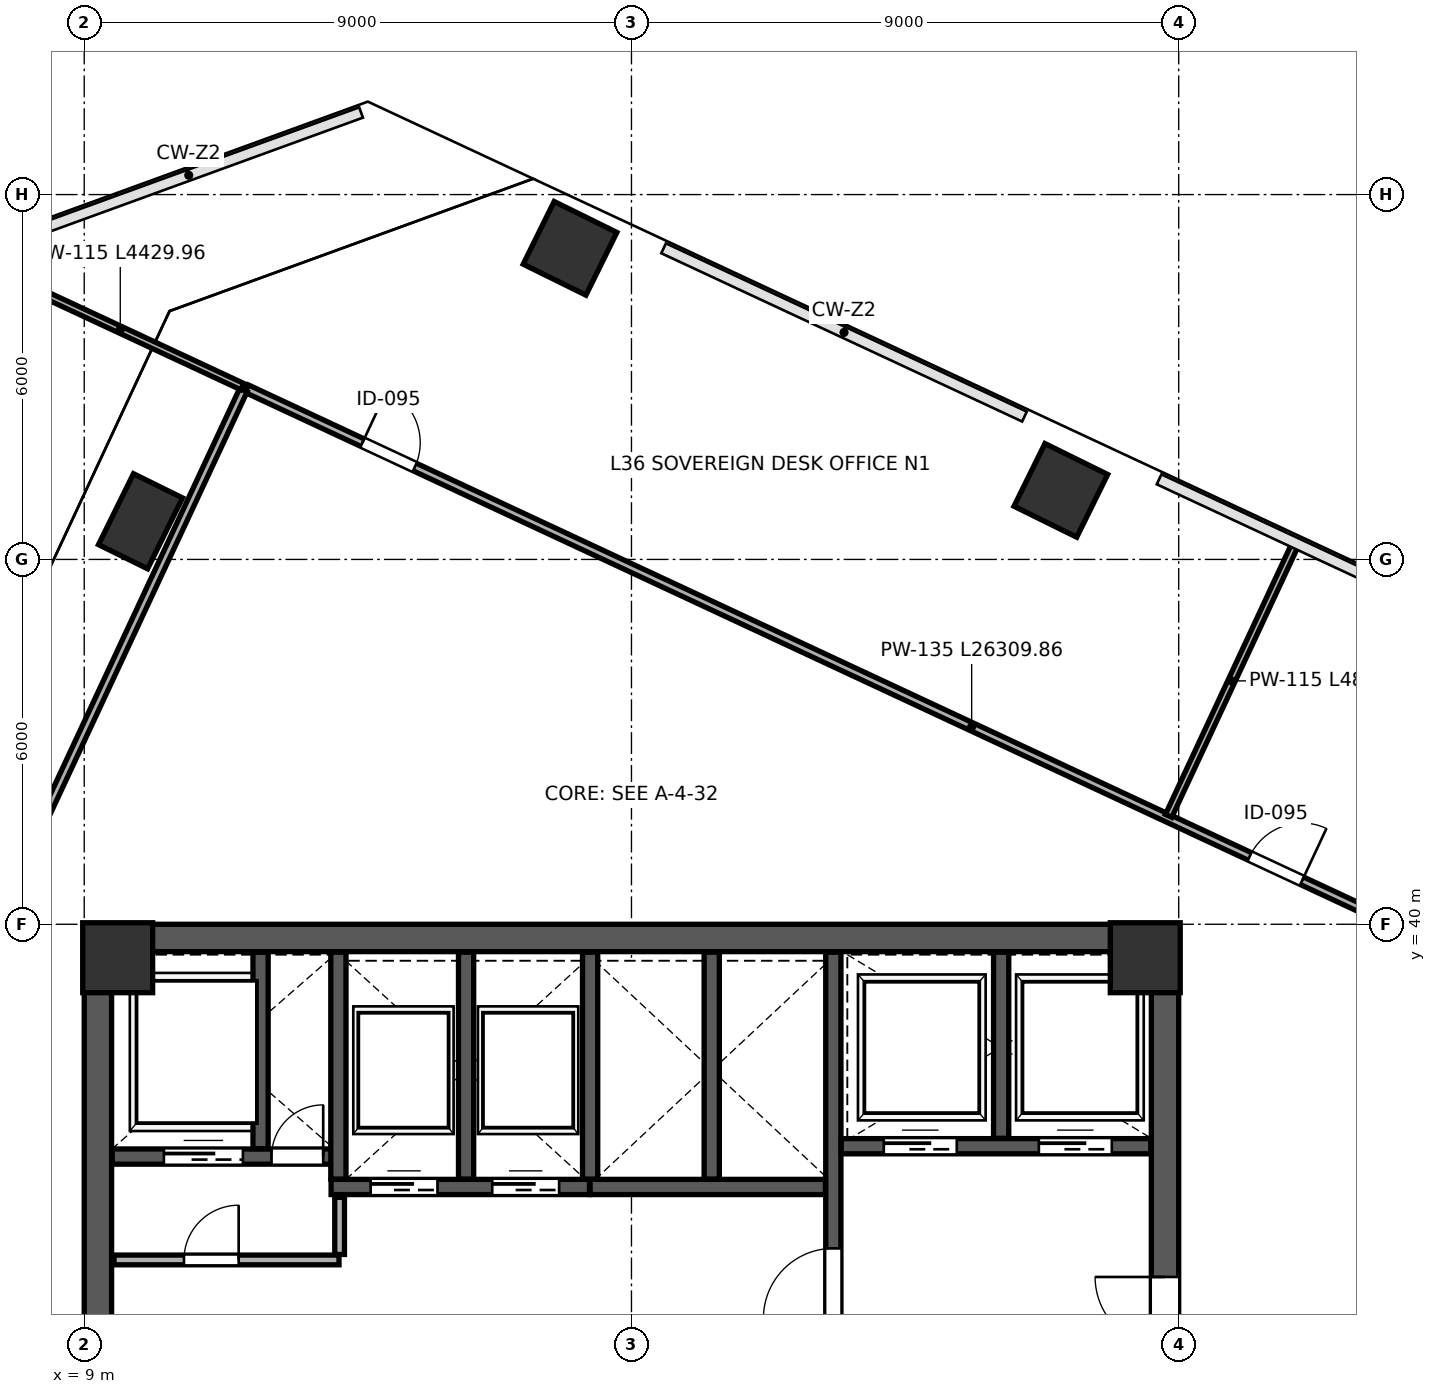
"""IFC4 building model, lengths in metres.
Left out: names, types, materials, properties, quantities, classifications, styles, units other than length and angle.
Written with IfcOpenShell. Run it as: python <this file> out.ifc"""

import sys

from ifc_helpers import new_model, si_unit, direction, frame, frame_2d, origin, origin_2d, place, context, subcontext, project, spatial, rectangle, extrude, clip, halfspace, source, transform, mapped, element, fill, save


model = new_model("IFC4")
c1 = context("Model", 3, precision=1e-05, world=origin(), true_north=direction((0.0, 1.0)))
c2 = subcontext(c1, "Body", "Model", "MODEL_VIEW")
j1 = project(units=[si_unit("LENGTHUNIT", "METRE"), si_unit("PLANEANGLEUNIT", "RADIAN")], contexts=[c1])
p1 = place(None, origin())
s1 = spatial("IfcSite", under=j1, at=p1, CompositionType="ELEMENT")
p2 = place(p1, origin())
s2 = spatial("IfcBuilding", under=s1, at=p2, CompositionType="ELEMENT")
p3 = place(p2, frame((0.0, 0.0, 162.4)))
s3 = spatial("IfcBuildingStorey", under=s2, at=p3, CompositionType="ELEMENT", Elevation=162.4)
m1 = source(origin(), c2, "Body", "SweptSolid", [
    extrude(rectangle(XDim=1.15, YDim=1.15, at=origin_2d()), origin(), (0.0, 0.0, 1.0), 4.199),
])
for number, where, z_axis, x_axis in (
    (1, (9.55, 39.45, 0.001), (0.0, 0.0, 1.0), (1.0, 0.0, 0.0)),
    (2, (26.45, 39.45, 0.001), (0.0, 0.0, 1.0), (1.0, 0.0, 0.0)),
):
    element("IfcColumn", number, at=place(p3, frame(where, z_axis=z_axis, x_axis=x_axis)), inside=s3, PredefinedType="COLUMN", context=c2, shape_type="MappedRepresentation", body=[
        mapped(m1, transform((0.0, 0.0, 0.0), scale=1.0)),
    ])
p4 = place(p3, frame((16.99, 51.116, 0.0), z_axis=(0.099055374896, 0.022262883441, 0.994832848636), x_axis=(-0.232626468204, -0.971528980681, 0.044903964055)))
e3 = element("IfcColumn", 3, at=p4, inside=s3, PredefinedType="COLUMN", context=c2, shape_type="Clipping", body=[
    clip(clip(extrude(rectangle(XDim=1.15, YDim=1.15, at=origin_2d()), origin(), (0.0, 0.0, 1.0), 4.222), halfspace(frame((0.0, 0.0, 0.079), z_axis=(0.0, 0.0, -1.0), x_axis=(1.0, 0.0, 0.0)), False)), halfspace(frame((0.0, 0.0, 4.143), z_axis=(0.0, 0.0, 1.0), x_axis=(1.0, 0.0, 0.0)), False)),
])
p5 = place(p3, frame((25.062, 47.135, 0.0), z_axis=(0.078215080244, -0.019293053127, 0.996749807787), x_axis=(-0.642812730681, -0.765194262388, 0.0356305218)))
e4 = element("IfcColumn", 4, at=p5, inside=s3, PredefinedType="COLUMN", context=c2, shape_type="Clipping", body=[
    clip(clip(extrude(rectangle(XDim=1.15, YDim=1.15, at=origin_2d()), origin(), (0.0, 0.0, 1.0), 4.214), halfspace(frame((0.0, 0.0, 0.063), z_axis=(0.0, 0.0, -1.0), x_axis=(1.0, 0.0, 0.0)), False)), halfspace(frame((0.0, 0.0, 4.151), z_axis=(0.0, 0.0, 1.0), x_axis=(1.0, 0.0, 0.0)), False)),
])
p6 = place(p3, frame((9.926, 46.627, 0.0), z_axis=(0.076252876943, 0.059069944885, 0.995337249564), x_axis=(0.201228472882, -0.978614892024, 0.042661397204)))
e5 = element("IfcColumn", 5, at=p6, inside=s3, PredefinedType="PILASTER", context=c2, shape_type="Clipping", body=[
    clip(clip(extrude(rectangle(XDim=0.9, YDim=1.3, at=origin_2d()), origin(), (0.0, 0.0, 1.0), 4.22), halfspace(frame((0.0, 0.0, 0.076), z_axis=(0.0, 0.0, -1.0), x_axis=(1.0, 0.0, 0.0)), False)), halfspace(frame((0.0, 0.0, 4.144), z_axis=(0.0, 0.0, 1.0), x_axis=(1.0, 0.0, 0.0)), False)),
])
p7 = place(p3, frame((9.225, 24.45, 0.0), z_axis=(0.0, 0.0, 1.0), x_axis=(0.0, 1.0, 0.0)))
e6 = element("IfcWall", 6, at=p7, inside=s3, PredefinedType="SHEAR", context=c2, shape_type="SweptSolid", body=[
    extrude(rectangle(XDim=15.1, YDim=0.45, at=frame_2d((7.55, 0.0))), origin(), (0.0, 0.0, 1.0), 3.96),
])
p8 = place(p3, frame((26.775, 24.45, 0.0), z_axis=(0.0, 0.0, 1.0), x_axis=(0.0, 1.0, 0.0)))
e7 = element("IfcWall", 7, at=p8, inside=s3, PredefinedType="SHEAR", context=c2, shape_type="SweptSolid", body=[
    extrude(rectangle(XDim=15.1, YDim=0.45, at=frame_2d((7.55, 0.0))), origin(), (0.0, 0.0, 1.0), 3.96),
])
p9 = place(p8, frame((8.6, 0.0, 0.0)))
e8 = element("IfcOpeningElement", 8, at=p9, cuts=e7, PredefinedType="OPENING", context=c2, shape_type="SweptSolid", body=[
    extrude(rectangle(XDim=1.15, YDim=2.2, at=frame_2d((0.575, 1.1))), frame((0.0, 0.235, 0.0), z_axis=(0.0, -1.0, 0.0), x_axis=(1.0, 0.0, 0.0)), (0.0, 0.0, 1.0), 0.47),
])
p10 = place(p3, frame((9.0, 39.775, 0.0), z_axis=(0.0, 0.0, 1.0), x_axis=(1.0, 0.0, 0.0)))
e9 = element("IfcWall", 9, at=p10, inside=s3, PredefinedType="SHEAR", context=c2, shape_type="SweptSolid", body=[
    extrude(rectangle(XDim=18.0, YDim=0.45, at=frame_2d((9.0, 0.0))), origin(), (0.0, 0.0, 1.0), 3.96),
])
p11 = place(p3, frame((21.32, 32.12, 0.0), z_axis=(0.0, 0.0, 1.0), x_axis=(0.0, 1.0, 0.0)))
e10 = element("IfcWall", 10, at=p11, inside=s3, PredefinedType="SHEAR", context=c2, shape_type="SweptSolid", body=[
    extrude(rectangle(XDim=7.42, YDim=0.25, at=frame_2d((3.71, 0.0))), origin(), (0.0, 0.0, 1.0), 3.96),
])
p12 = place(p11, frame((1.4, 0.0, 0.0)))
e11 = element("IfcOpeningElement", 11, at=p12, cuts=e10, PredefinedType="OPENING", context=c2, shape_type="SweptSolid", body=[
    extrude(rectangle(XDim=1.15, YDim=2.2, at=frame_2d((0.575, 1.1))), frame((0.0, 0.135, 0.0), z_axis=(0.0, -1.0, 0.0), x_axis=(1.0, 0.0, 0.0)), (0.0, 0.0, 1.0), 0.27),
])
p13 = place(p3, frame((9.46, 36.18, 0.0), z_axis=(0.0, 0.0, 1.0), x_axis=(1.0, 0.0, 0.0)))
e12 = element("IfcWall", 12, at=p13, inside=s3, PredefinedType="SHEAR", context=c2, shape_type="SweptSolid", body=[
    extrude(rectangle(XDim=3.79, YDim=0.25, at=frame_2d((1.895, 0.0))), origin(), (0.0, 0.0, 1.0), 3.96),
])
p14 = place(p13, frame((2.62, 0.0, 0.0)))
e13 = element("IfcOpeningElement", 13, at=p14, cuts=e12, PredefinedType="OPENING", context=c2, shape_type="SweptSolid", body=[
    extrude(rectangle(XDim=0.85, YDim=2.1, at=frame_2d((0.425, 1.05))), frame((0.0, 0.135, 0.0), z_axis=(0.0, -1.0, 0.0), x_axis=(1.0, 0.0, 0.0)), (0.0, 0.0, 1.0), 0.27),
])
p15 = place(p13, frame((0.85, 0.0, 0.0)))
e14 = element("IfcOpeningElement", 14, at=p15, cuts=e12, PredefinedType="OPENING", context=c2, shape_type="SweptSolid", body=[
    extrude(rectangle(XDim=1.3, YDim=2.25, at=frame_2d((0.65, 1.125))), frame((0.0, 0.135, 0.0), z_axis=(0.0, -1.0, 0.0), x_axis=(1.0, 0.0, 0.0)), (0.0, 0.0, 1.0), 0.27),
])
p16 = place(p3, frame((11.9, 36.31, 0.0), z_axis=(0.0, 0.0, 1.0), x_axis=(0.0, 1.0, 0.0)))
e15 = element("IfcWall", 15, at=p16, inside=s3, PredefinedType="SHEAR", context=c2, shape_type="SweptSolid", body=[
    extrude(rectangle(XDim=3.23, YDim=0.25, at=frame_2d((1.615, 0.0))), origin(), (0.0, 0.0, 1.0), 3.96),
])
p17 = place(p3, frame((21.45, 36.35, 0.0), z_axis=(0.0, 0.0, 1.0), x_axis=(1.0, 0.0, 0.0)))
e16 = element("IfcWall", 16, at=p17, inside=s3, PredefinedType="SHEAR", context=c2, shape_type="SweptSolid", body=[
    extrude(rectangle(XDim=5.09, YDim=0.25, at=frame_2d((2.545, 0.0))), origin(), (0.0, 0.0, 1.0), 3.96),
])
p18 = place(p17, frame((0.7, 0.0, 0.0)))
e17 = element("IfcOpeningElement", 17, at=p18, cuts=e16, PredefinedType="OPENING", context=c2, shape_type="SweptSolid", body=[
    extrude(rectangle(XDim=1.2, YDim=2.2, at=frame_2d((0.6, 1.1))), frame((0.0, 0.135, 0.0), z_axis=(0.0, -1.0, 0.0), x_axis=(1.0, 0.0, 0.0)), (0.0, 0.0, 1.0), 0.27),
])
p19 = place(p17, frame((3.25, 0.0, 0.0)))
e18 = element("IfcOpeningElement", 18, at=p19, cuts=e16, PredefinedType="OPENING", context=c2, shape_type="SweptSolid", body=[
    extrude(rectangle(XDim=1.2, YDim=2.2, at=frame_2d((0.6, 1.1))), frame((0.0, 0.135, 0.0), z_axis=(0.0, -1.0, 0.0), x_axis=(1.0, 0.0, 0.0)), (0.0, 0.0, 1.0), 0.27),
])
p20 = place(p3, frame((24.08, 36.48, 0.0), z_axis=(0.0, 0.0, 1.0), x_axis=(0.0, 1.0, 0.0)))
e19 = element("IfcWall", 19, at=p20, inside=s3, PredefinedType="SHEAR", context=c2, shape_type="SweptSolid", body=[
    extrude(rectangle(XDim=3.06, YDim=0.25, at=frame_2d((1.53, 0.0))), origin(), (0.0, 0.0, 1.0), 3.96),
])
p21 = place(p3, frame((13.06, 35.68, 0.0), z_axis=(0.0, 0.0, 1.0), x_axis=(1.0, 0.0, 0.0)))
e20 = element("IfcWall", 20, at=p21, inside=s3, PredefinedType="SHEAR", context=c2, shape_type="SweptSolid", body=[
    extrude(rectangle(XDim=4.25, YDim=0.25, at=frame_2d((2.125, 0.0))), origin(), (0.0, 0.0, 1.0), 3.96),
])
p22 = place(p21, frame((0.65, 0.0, 0.0)))
e21 = element("IfcOpeningElement", 21, at=p22, cuts=e20, PredefinedType="OPENING", context=c2, shape_type="SweptSolid", body=[
    extrude(rectangle(XDim=1.1, YDim=2.2, at=frame_2d((0.55, 1.1))), frame((0.0, 0.135, 0.0), z_axis=(0.0, -1.0, 0.0), x_axis=(1.0, 0.0, 0.0)), (0.0, 0.0, 1.0), 0.27),
])
p23 = place(p21, frame((2.65, 0.0, 0.0)))
e22 = element("IfcOpeningElement", 22, at=p23, cuts=e20, PredefinedType="OPENING", context=c2, shape_type="SweptSolid", body=[
    extrude(rectangle(XDim=1.1, YDim=2.2, at=frame_2d((0.55, 1.1))), frame((0.0, 0.135, 0.0), z_axis=(0.0, -1.0, 0.0), x_axis=(1.0, 0.0, 0.0)), (0.0, 0.0, 1.0), 0.27),
])
for number, where, z_axis, x_axis in (
    (23, (13.18, 35.81, 0.0), (0.0, 0.0, 1.0), (0.0, 1.0, 0.0)),
    (24, (15.28, 35.81, 0.0), (0.0, 0.0, 1.0), (0.0, 1.0, 0.0)),
):
    element("IfcWall", number, at=place(p3, frame(where, z_axis=z_axis, x_axis=x_axis)), inside=s3, PredefinedType="SHEAR", context=c2, shape_type="SweptSolid", body=[
        extrude(rectangle(XDim=3.73, YDim=0.25, at=frame_2d((1.865, 0.0))), origin(), (0.0, 0.0, 1.0), 3.96),
    ])
p24 = place(p3, frame((17.32, 35.68, 0.0), z_axis=(0.0, 0.0, 1.0), x_axis=(1.0, 0.0, 0.0)))
e25 = element("IfcWall", 25, at=p24, inside=s3, PredefinedType="SHEAR", context=c2, shape_type="SweptSolid", body=[
    extrude(rectangle(XDim=3.87, YDim=0.25, at=frame_2d((1.935, 0.0))), origin(), (0.0, 0.0, 1.0), 3.96),
])
for number, where, z_axis, x_axis in (
    (26, (17.32, 35.81, 0.0), (0.0, 0.0, 1.0), (0.0, 1.0, 0.0)),
    (27, (19.32, 35.81, 0.0), (0.0, 0.0, 1.0), (0.0, 1.0, 0.0)),
):
    element("IfcWall", number, at=place(p3, frame(where, z_axis=z_axis, x_axis=x_axis)), inside=s3, PredefinedType="SHEAR", context=c2, shape_type="SweptSolid", body=[
        extrude(rectangle(XDim=3.73, YDim=0.25, at=frame_2d((1.865, 0.0))), origin(), (0.0, 0.0, 1.0), 3.96),
    ])
p25 = place(p3, frame((9.49, 34.48, 0.0), z_axis=(0.0, 0.0, 1.0), x_axis=(1.0, 0.0, 0.0)))
e28 = element("IfcWall", 28, at=p25, inside=s3, PredefinedType="PARTITIONING", context=c2, shape_type="SweptSolid", body=[
    extrude(rectangle(XDim=3.7, YDim=0.16, at=frame_2d((1.85, 0.0))), origin(), (0.0, 0.0, 1.0), 3.96),
])
p26 = place(p25, frame((1.15, 0.0, 0.0)))
e29 = element("IfcOpeningElement", 29, at=p26, cuts=e28, PredefinedType="OPENING", context=c2, shape_type="SweptSolid", body=[
    extrude(rectangle(XDim=0.9, YDim=2.15, at=frame_2d((0.45, 1.075))), frame((0.0, 0.09, 0.0), z_axis=(0.0, -1.0, 0.0), x_axis=(1.0, 0.0, 0.0)), (0.0, 0.0, 1.0), 0.18),
])
p27 = place(p3, frame((13.2, 34.57, 0.0), z_axis=(0.0, 0.0, 1.0), x_axis=(0.0, 1.0, 0.0)))
e30 = element("IfcWall", 30, at=p27, inside=s3, PredefinedType="PARTITIONING", context=c2, shape_type="SweptSolid", body=[
    extrude(rectangle(XDim=0.94, YDim=0.16, at=frame_2d((0.47, 0.0))), origin(), (0.0, 0.0, 1.0), 3.96),
])
p28 = place(p3, frame((11.673, 48.808, 0.0), z_axis=(0.0, 0.0, 1.0), x_axis=(0.906307085664, -0.422619765836, 0.0)))
e31 = element("IfcWall", 31, at=p28, inside=s3, PredefinedType="PARTITIONING", context=c2, shape_type="SweptSolid", body=[
    extrude(rectangle(XDim=26.31, YDim=0.135, at=frame_2d((13.155, 0.0))), origin(), (0.0, 0.0, 1.0), 3.96),
])
p29 = place(p28, frame((2.1, 0.0, 0.0)))
e32 = element("IfcOpeningElement", 32, at=p29, cuts=e31, PredefinedType="OPENING", context=c2, shape_type="SweptSolid", body=[
    extrude(rectangle(XDim=0.95, YDim=2.15, at=frame_2d((0.475, 1.075))), frame((0.0, 0.078, 0.0), z_axis=(0.0, -1.0, 0.0), x_axis=(1.0, 0.0, 0.0)), (0.0, 0.0, 1.0), 0.155),
])
p30 = place(p28, frame((18.2, 0.0, 0.0)))
e33 = element("IfcOpeningElement", 33, at=p30, cuts=e31, PredefinedType="OPENING", context=c2, shape_type="SweptSolid", body=[
    extrude(rectangle(XDim=0.95, YDim=2.15, at=frame_2d((0.475, 1.075))), frame((0.0, 0.078, 0.0), z_axis=(0.0, -1.0, 0.0), x_axis=(1.0, 0.0, 0.0)), (0.0, 0.0, 1.0), 0.155),
])
p31 = place(p3, frame((26.834, 41.782, 0.0), z_axis=(0.0, 0.0, 1.0), x_axis=(0.422631768009, 0.906301488838, 0.0)))
e34 = element("IfcWall", 34, at=p31, inside=s3, PredefinedType="PARTITIONING", context=c2, shape_type="SweptSolid", body=[
    extrude(rectangle(XDim=4.9, YDim=0.115, at=frame_2d((2.45, 0.0))), origin(), (0.0, 0.0, 1.0), 3.195),
])
p32 = place(p3, frame((1.756, 27.635, 0.0), z_axis=(0.0, 0.0, 1.0), x_axis=(0.422615732035, 0.906308966653, 0.0)))
e35 = element("IfcWall", 35, at=p32, inside=s3, PredefinedType="PARTITIONING", context=c2, shape_type="SweptSolid", body=[
    extrude(rectangle(XDim=23.34, YDim=0.135, at=frame_2d((11.67, 0.0))), origin(), (0.0, 0.0, 1.0), 3.96),
])
p33 = place(p32, frame((1.7, 0.0, 0.0)))
e36 = element("IfcOpeningElement", 36, at=p33, cuts=e35, PredefinedType="OPENING", context=c2, shape_type="SweptSolid", body=[
    extrude(rectangle(XDim=0.95, YDim=2.15, at=frame_2d((0.475, 1.075))), frame((0.0, 0.078, 0.0), z_axis=(0.0, -1.0, 0.0), x_axis=(1.0, 0.0, 0.0)), (0.0, 0.0, 1.0), 0.155),
])
p34 = place(p32, frame((9.8, 0.0, 0.0)))
e37 = element("IfcOpeningElement", 37, at=p34, cuts=e35, PredefinedType="OPENING", context=c2, shape_type="SweptSolid", body=[
    extrude(rectangle(XDim=0.95, YDim=2.15, at=frame_2d((0.475, 1.075))), frame((0.0, 0.078, 0.0), z_axis=(0.0, -1.0, 0.0), x_axis=(1.0, 0.0, 0.0)), (0.0, 0.0, 1.0), 0.155),
])
p35 = place(p3, frame((7.585, 50.714, 0.0), z_axis=(0.0, 0.0, 1.0), x_axis=(0.906295742894, -0.422644089526, 0.0)))
e38 = element("IfcWall", 38, at=p35, inside=s3, PredefinedType="PARTITIONING", context=c2, shape_type="SweptSolid", body=[
    extrude(rectangle(XDim=4.43, YDim=0.115, at=frame_2d((2.215, 0.0))), origin(), (0.0, 0.0, 1.0), 3.96),
])
m2 = source(origin(), c2, "Body", "SweptSolid", [
    extrude(rectangle(XDim=1.15, YDim=2.2, at=frame_2d((0.575, 1.1))), frame((0.0, 0.025, 0.0), z_axis=(0.0, -1.0, 0.0), x_axis=(1.0, 0.0, 0.0)), (0.0, 0.0, 1.0), 0.05),
])
p36 = place(p12, origin())
e39 = element("IfcDoor", 39, at=p36, inside=s3, OperationType="SINGLE_SWING_LEFT", PredefinedType="DOOR", context=c2, shape_type="MappedRepresentation", body=[
    mapped(m2, transform((0.0, 0.0, 0.0), scale=1.0)),
])
fill(e11, e39)
p37 = place(p9, origin())
e40 = element("IfcDoor", 40, at=p37, inside=s3, OperationType="SINGLE_SWING_RIGHT", PredefinedType="DOOR", context=c2, shape_type="MappedRepresentation", body=[
    mapped(m2, transform((0.0, 0.0, 0.0), scale=1.0)),
])
fill(e8, e40)
m3 = source(origin(), c2, "Body", "SweptSolid", [
    extrude(rectangle(XDim=0.85, YDim=2.1, at=frame_2d((0.425, 1.05))), frame((0.0, 0.025, 0.0), z_axis=(0.0, -1.0, 0.0), x_axis=(1.0, 0.0, 0.0)), (0.0, 0.0, 1.0), 0.05),
])
p38 = place(p14, origin())
e41 = element("IfcDoor", 41, at=p38, inside=s3, OperationType="SINGLE_SWING_RIGHT", PredefinedType="DOOR", context=c2, shape_type="MappedRepresentation", body=[
    mapped(m3, transform((0.0, 0.0, 0.0), scale=1.0)),
])
fill(e13, e41)
m4 = source(origin(), c2, "Body", "SweptSolid", [
    extrude(rectangle(XDim=1.1, YDim=2.2, at=frame_2d((0.55, 1.1))), frame((0.0, 0.025, 0.0), z_axis=(0.0, -1.0, 0.0), x_axis=(1.0, 0.0, 0.0)), (0.0, 0.0, 1.0), 0.05),
])
p39 = place(p22, origin())
e42 = element("IfcDoor", 42, at=p39, inside=s3, OperationType="SLIDING_TO_LEFT", PredefinedType="DOOR", context=c2, shape_type="MappedRepresentation", body=[
    mapped(m4, transform((0.0, 0.0, 0.0), scale=1.0)),
])
fill(e21, e42)
p40 = place(p23, origin())
e43 = element("IfcDoor", 43, at=p40, inside=s3, OperationType="SLIDING_TO_RIGHT", PredefinedType="DOOR", context=c2, shape_type="MappedRepresentation", body=[
    mapped(m4, transform((0.0, 0.0, 0.0), scale=1.0)),
])
fill(e22, e43)
m5 = source(origin(), c2, "Body", "SweptSolid", [
    extrude(rectangle(XDim=1.2, YDim=2.2, at=frame_2d((0.6, 1.1))), frame((0.0, 0.025, 0.0), z_axis=(0.0, -1.0, 0.0), x_axis=(1.0, 0.0, 0.0)), (0.0, 0.0, 1.0), 0.05),
])
p41 = place(p18, origin())
e44 = element("IfcDoor", 44, at=p41, inside=s3, OperationType="SLIDING_TO_LEFT", PredefinedType="DOOR", context=c2, shape_type="MappedRepresentation", body=[
    mapped(m5, transform((0.0, 0.0, 0.0), scale=1.0)),
])
fill(e17, e44)
p42 = place(p19, origin())
e45 = element("IfcDoor", 45, at=p42, inside=s3, OperationType="SLIDING_TO_RIGHT", PredefinedType="DOOR", context=c2, shape_type="MappedRepresentation", body=[
    mapped(m5, transform((0.0, 0.0, 0.0), scale=1.0)),
])
fill(e18, e45)
m6 = source(origin(), c2, "Body", "SweptSolid", [
    extrude(rectangle(XDim=1.3, YDim=2.25, at=frame_2d((0.65, 1.125))), frame((0.0, 0.025, 0.0), z_axis=(0.0, -1.0, 0.0), x_axis=(1.0, 0.0, 0.0)), (0.0, 0.0, 1.0), 0.05),
])
p43 = place(p15, origin())
e46 = element("IfcDoor", 46, at=p43, inside=s3, OperationType="SLIDING_TO_LEFT", PredefinedType="DOOR", context=c2, shape_type="MappedRepresentation", body=[
    mapped(m6, transform((0.0, 0.0, 0.0), scale=1.0)),
])
fill(e14, e46)
m7 = source(origin(), c2, "Body", "SweptSolid", [
    extrude(rectangle(XDim=0.9, YDim=2.15, at=frame_2d((0.45, 1.075))), frame((0.0, 0.025, 0.0), z_axis=(0.0, -1.0, 0.0), x_axis=(1.0, 0.0, 0.0)), (0.0, 0.0, 1.0), 0.05),
])
p44 = place(p26, origin())
e47 = element("IfcDoor", 47, at=p44, inside=s3, OperationType="SINGLE_SWING_RIGHT", PredefinedType="DOOR", context=c2, shape_type="MappedRepresentation", body=[
    mapped(m7, transform((0.0, 0.0, 0.0), scale=1.0)),
])
fill(e29, e47)
m8 = source(origin(), c2, "Body", "SweptSolid", [
    extrude(rectangle(XDim=0.95, YDim=2.15, at=frame_2d((0.475, 1.075))), frame((0.0, 0.025, 0.0), z_axis=(0.0, -1.0, 0.0), x_axis=(1.0, 0.0, 0.0)), (0.0, 0.0, 1.0), 0.05),
])
p45 = place(p29, origin())
e48 = element("IfcDoor", 48, at=p45, inside=s3, OperationType="SINGLE_SWING_LEFT", PredefinedType="DOOR", context=c2, shape_type="MappedRepresentation", body=[
    mapped(m8, transform((0.0, 0.0, 0.0), scale=1.0)),
])
fill(e32, e48)
p46 = place(p30, origin())
e49 = element("IfcDoor", 49, at=p46, inside=s3, OperationType="SINGLE_SWING_RIGHT", PredefinedType="DOOR", context=c2, shape_type="MappedRepresentation", body=[
    mapped(m8, transform((0.0, 0.0, 0.0), scale=1.0)),
])
fill(e33, e49)
save(model, sys.argv[1])
